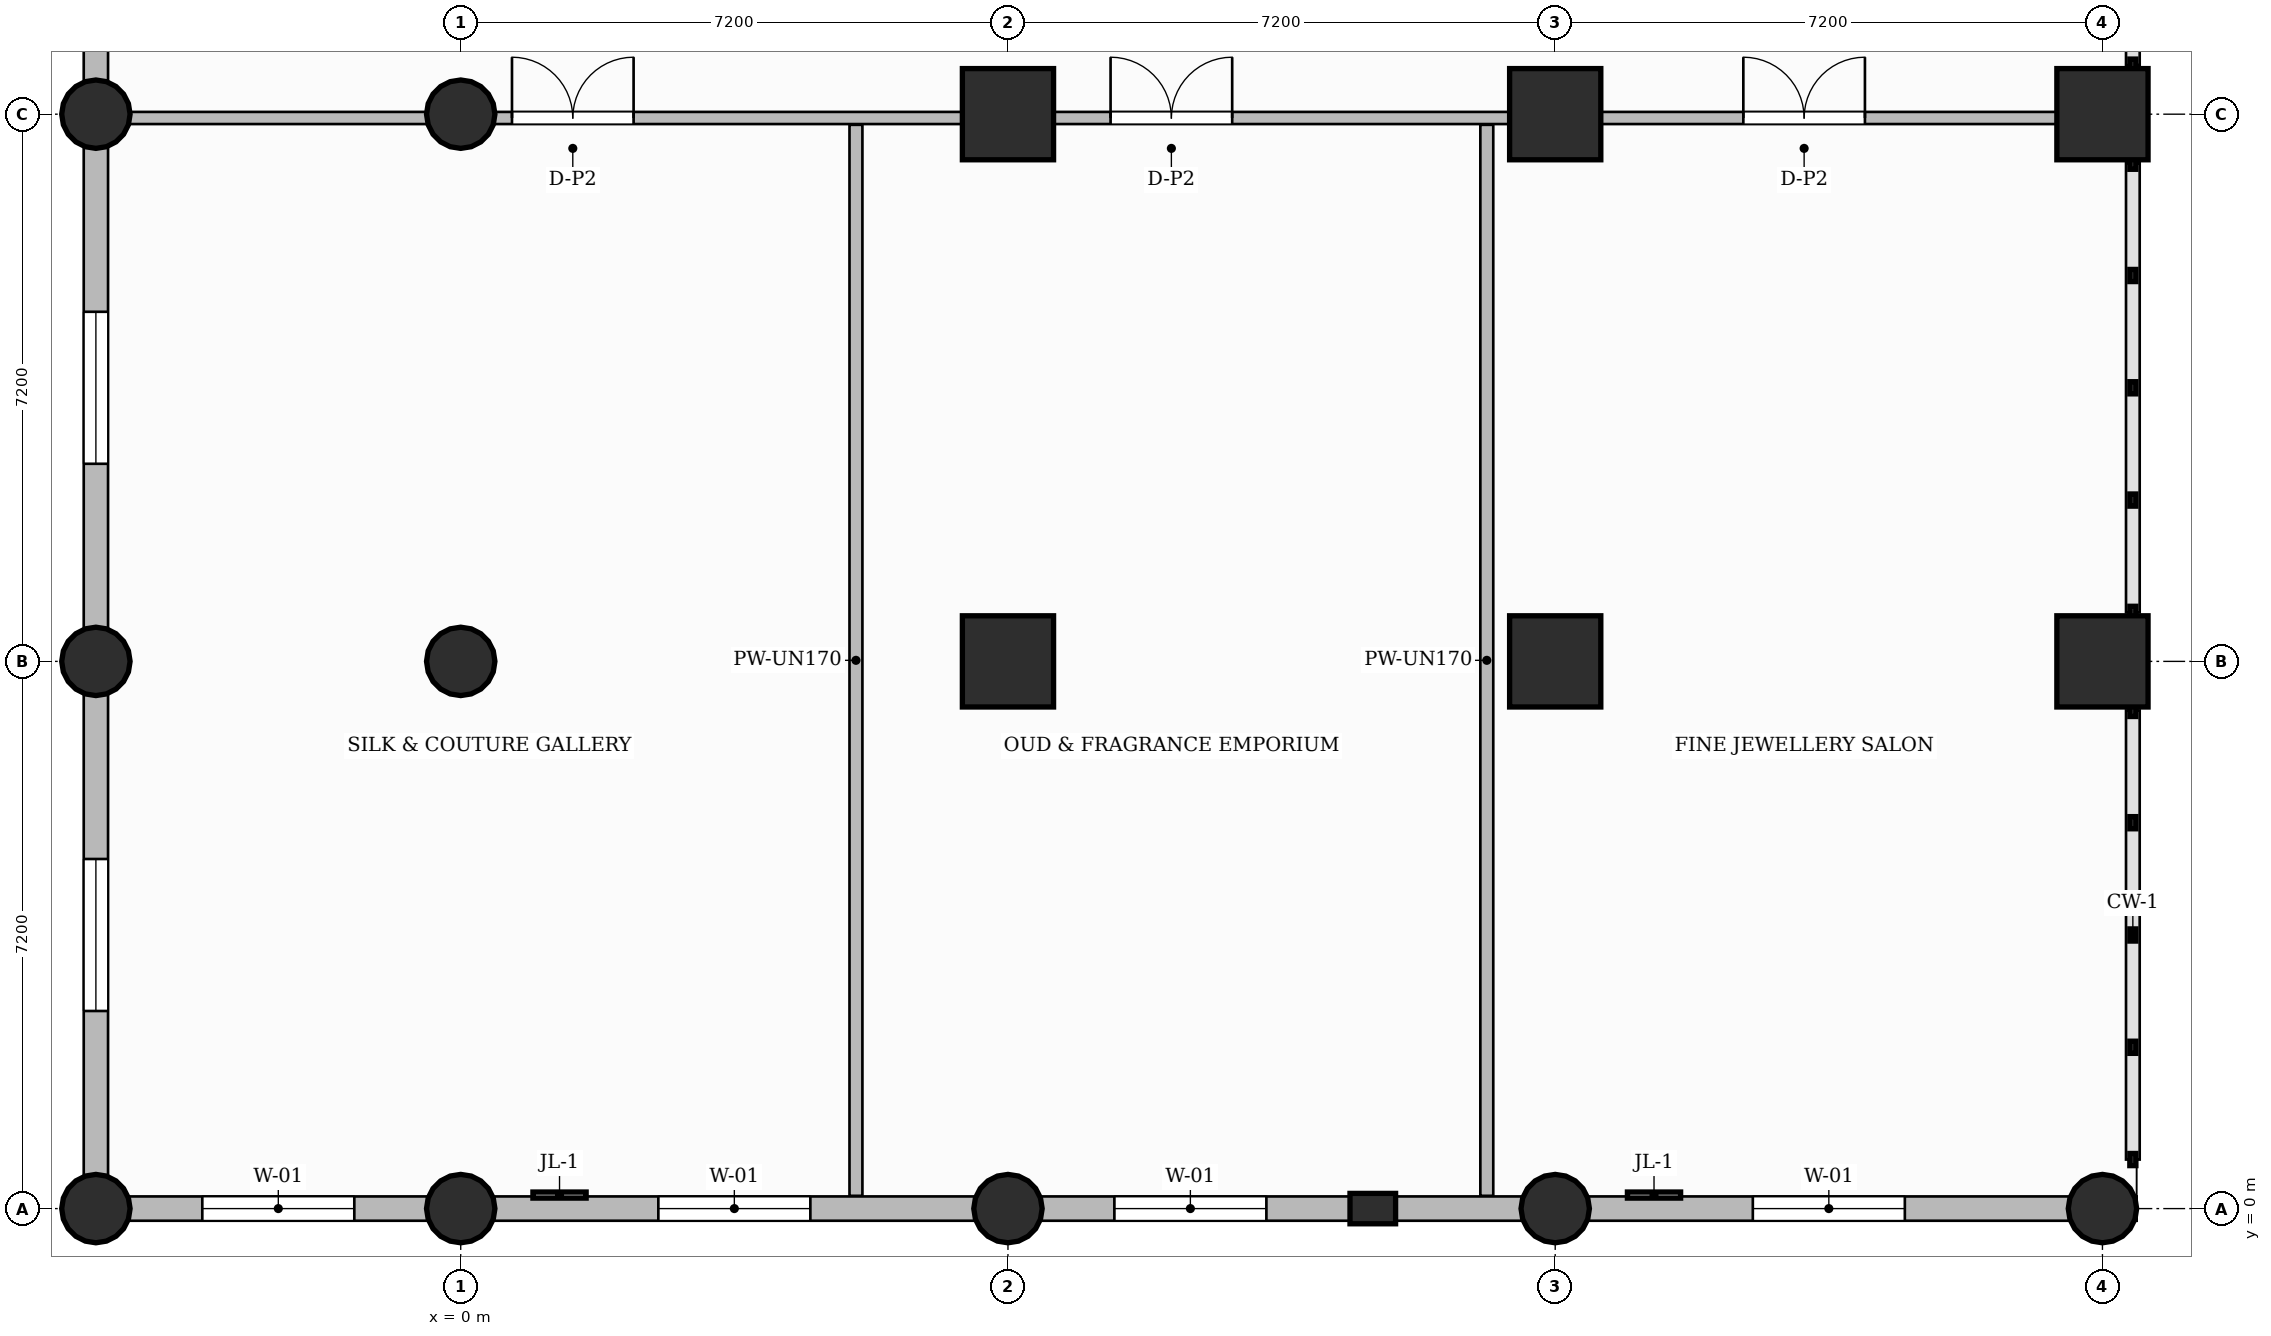
"""IFC4 building model, lengths in metres.
Left out: names, types, materials, properties, quantities, classifications, styles, units other than length and angle.
Written with IfcOpenShell. Run it as: python <this file> out.ifc"""

import sys

from ifc_helpers import new_model, si_unit, direction, frame, frame_2d, origin, origin_2d, place, context, subcontext, project, spatial, rectangle, circle, extrude, source, transform, mapped, element, fill, save


model = new_model("IFC4")
c1 = context("Model", 3, precision=1e-05, world=origin(), true_north=direction((0.0, 1.0)))
c2 = subcontext(c1, "Body", "Model", "MODEL_VIEW")
j1 = project(units=[si_unit("LENGTHUNIT", "METRE"), si_unit("PLANEANGLEUNIT", "RADIAN")], contexts=[c1])
p1 = place(None, origin())
s1 = spatial("IfcSite", under=j1, at=p1, CompositionType="ELEMENT")
p2 = place(p1, origin())
s2 = spatial("IfcBuilding", under=s1, at=p2, CompositionType="ELEMENT")
p3 = place(p2, frame((0.0, 0.0, 5.4)))
s3 = spatial("IfcBuildingStorey", under=s2, at=p3, CompositionType="ELEMENT", Elevation=5.4)
m1 = source(origin(), c2, "Body", "SweptSolid", [
    extrude(circle(Radius=0.45, at=origin_2d()), origin(), (0.0, 0.0, 1.0), 5.4),
])
for number, where, z_axis, x_axis in (
    (1, (-4.8, 0.0, 0.0), (0.0, 0.0, 1.0), (1.0, 0.0, 0.0)),
    (2, (-4.8, 7.2, 0.0), (0.0, 0.0, 1.0), (1.0, 0.0, 0.0)),
    (3, (-4.8, 14.4, 0.0), (0.0, 0.0, 1.0), (1.0, 0.0, 0.0)),
    (4, (0.0, 0.0, 0.0), (0.0, 0.0, 1.0), (1.0, 0.0, 0.0)),
    (5, (0.0, 7.2, 0.0), (0.0, 0.0, 1.0), (1.0, 0.0, 0.0)),
    (6, (0.0, 14.4, 0.0), (0.0, 0.0, 1.0), (1.0, 0.0, 0.0)),
    (7, (7.2, 0.0, 0.0), (0.0, 0.0, 1.0), (1.0, 0.0, 0.0)),
):
    element("IfcColumn", number, at=place(p3, frame(where, z_axis=z_axis, x_axis=x_axis)), inside=s3, PredefinedType="COLUMN", context=c2, shape_type="MappedRepresentation", body=[
        mapped(m1, transform((0.0, 0.0, 0.0), scale=1.0)),
    ])
m2 = source(origin(), c2, "Body", "SweptSolid", [
    extrude(rectangle(XDim=1.2, YDim=1.2, at=origin_2d()), origin(), (0.0, 0.0, 1.0), 5.4),
])
for number, where, z_axis, x_axis in (
    (8, (7.2, 7.2, 0.0), (0.0, 0.0, 1.0), (1.0, 0.0, 0.0)),
    (9, (7.2, 14.4, 0.0), (0.0, 0.0, 1.0), (1.0, 0.0, 0.0)),
):
    element("IfcColumn", number, at=place(p3, frame(where, z_axis=z_axis, x_axis=x_axis)), inside=s3, PredefinedType="COLUMN", context=c2, shape_type="MappedRepresentation", body=[
        mapped(m2, transform((0.0, 0.0, 0.0), scale=1.0)),
    ])
p4 = place(p3, frame((14.4, 0.0, 0.0), z_axis=(0.0, 0.0, 1.0), x_axis=(1.0, 0.0, 0.0)))
e10 = element("IfcColumn", 10, at=p4, inside=s3, PredefinedType="COLUMN", context=c2, shape_type="MappedRepresentation", body=[
    mapped(m1, transform((0.0, 0.0, 0.0), scale=1.0)),
])
for number, where, z_axis, x_axis in (
    (11, (14.4, 7.2, 0.0), (0.0, 0.0, 1.0), (1.0, 0.0, 0.0)),
    (12, (14.4, 14.4, 0.0), (0.0, 0.0, 1.0), (1.0, 0.0, 0.0)),
):
    element("IfcColumn", number, at=place(p3, frame(where, z_axis=z_axis, x_axis=x_axis)), inside=s3, PredefinedType="COLUMN", context=c2, shape_type="MappedRepresentation", body=[
        mapped(m2, transform((0.0, 0.0, 0.0), scale=1.0)),
    ])
p5 = place(p3, frame((21.6, 0.0, 0.0), z_axis=(0.0, 0.0, 1.0), x_axis=(1.0, 0.0, 0.0)))
e13 = element("IfcColumn", 13, at=p5, inside=s3, PredefinedType="COLUMN", context=c2, shape_type="MappedRepresentation", body=[
    mapped(m1, transform((0.0, 0.0, 0.0), scale=1.0)),
])
for number, where, z_axis, x_axis in (
    (14, (21.6, 7.2, 0.0), (0.0, 0.0, 1.0), (1.0, 0.0, 0.0)),
    (15, (21.6, 14.4, 0.0), (0.0, 0.0, 1.0), (1.0, 0.0, 0.0)),
):
    element("IfcColumn", number, at=place(p3, frame(where, z_axis=z_axis, x_axis=x_axis)), inside=s3, PredefinedType="COLUMN", context=c2, shape_type="MappedRepresentation", body=[
        mapped(m2, transform((0.0, 0.0, 0.0), scale=1.0)),
    ])
m3 = source(origin(), c2, "Body", "SweptSolid", [
    extrude(rectangle(XDim=0.6, YDim=0.4, at=origin_2d()), origin(), (0.0, 0.0, 1.0), 5.4),
])
p6 = place(p3, frame((12.0, 0.0, 0.0), z_axis=(0.0, 0.0, 1.0), x_axis=(1.0, 0.0, 0.0)))
e16 = element("IfcColumn", 16, at=p6, inside=s3, PredefinedType="PILASTER", context=c2, shape_type="MappedRepresentation", body=[
    mapped(m3, transform((0.0, 0.0, 0.0), scale=1.0)),
])
p7 = place(p3, frame((-4.36, 14.35, 0.0), z_axis=(0.0, 0.0, 1.0), x_axis=(1.0, 0.0, 0.0)))
e17 = element("IfcWall", 17, at=p7, inside=s3, PredefinedType="PARTITIONING", context=c2, shape_type="SweptSolid", body=[
    extrude(rectangle(XDim=26.12, YDim=0.16, at=frame_2d((13.06, 0.0))), origin(), (0.0, 0.0, 1.0), 4.185),
])
p8 = place(p7, frame((5.034, 0.0, 0.0)))
e18 = element("IfcOpeningElement", 18, at=p8, cuts=e17, PredefinedType="OPENING", context=c2, shape_type="SweptSolid", body=[
    extrude(rectangle(XDim=1.6, YDim=2.4, at=frame_2d((0.8, 1.2))), frame((0.0, 0.09, 0.0), z_axis=(0.0, -1.0, 0.0), x_axis=(1.0, 0.0, 0.0)), (0.0, 0.0, 1.0), 0.18),
])
p9 = place(p7, frame((12.91, 0.0, 0.0)))
e19 = element("IfcOpeningElement", 19, at=p9, cuts=e17, PredefinedType="OPENING", context=c2, shape_type="SweptSolid", body=[
    extrude(rectangle(XDim=1.6, YDim=2.4, at=frame_2d((0.8, 1.2))), frame((0.0, 0.09, 0.0), z_axis=(0.0, -1.0, 0.0), x_axis=(1.0, 0.0, 0.0)), (0.0, 0.0, 1.0), 0.18),
])
p10 = place(p7, frame((21.235, 0.0, 0.0)))
e20 = element("IfcOpeningElement", 20, at=p10, cuts=e17, PredefinedType="OPENING", context=c2, shape_type="SweptSolid", body=[
    extrude(rectangle(XDim=1.6, YDim=2.4, at=frame_2d((0.8, 1.2))), frame((0.0, 0.09, 0.0), z_axis=(0.0, -1.0, 0.0), x_axis=(1.0, 0.0, 0.0)), (0.0, 0.0, 1.0), 0.18),
])
for number, where, z_axis, x_axis in (
    (21, (5.2, 0.168, 0.0), (0.0, 0.0, 1.0), (0.0, 1.0, 0.0)),
    (22, (13.5, 0.168, 0.0), (0.0, 0.0, 1.0), (0.0, 1.0, 0.0)),
):
    element("IfcWall", number, at=place(p3, frame(where, z_axis=z_axis, x_axis=x_axis)), inside=s3, PredefinedType="PARTITIONING", context=c2, shape_type="SweptSolid", body=[
        extrude(rectangle(XDim=14.092, YDim=0.17, at=frame_2d((7.046, 0.0))), origin(), (0.0, 0.0, 1.0), 5.1),
    ])
p11 = place(p3, frame((-4.8, 0.0, 0.0), z_axis=(0.0, 0.0, 1.0), x_axis=(1.0, 0.0, 0.0)))
e23 = element("IfcWall", 23, at=p11, inside=s3, PredefinedType="SOLIDWALL", context=c2, shape_type="SweptSolid", body=[
    extrude(rectangle(XDim=26.85, YDim=0.32, at=frame_2d((13.425, 0.0))), origin(), (0.0, 0.0, 1.0), 4.185),
])
p12 = place(p11, frame((1.4, 0.0, 0.75)))
e24 = element("IfcOpeningElement", 24, at=p12, cuts=e23, PredefinedType="OPENING", context=c2, shape_type="SweptSolid", body=[
    extrude(rectangle(XDim=2.0, YDim=2.6, at=frame_2d((1.0, 1.3))), frame((0.0, 0.17, 0.0), z_axis=(0.0, -1.0, 0.0), x_axis=(1.0, 0.0, 0.0)), (0.0, 0.0, 1.0), 0.34),
])
p13 = place(p11, frame((7.4, 0.0, 0.75)))
e25 = element("IfcOpeningElement", 25, at=p13, cuts=e23, PredefinedType="OPENING", context=c2, shape_type="SweptSolid", body=[
    extrude(rectangle(XDim=2.0, YDim=2.6, at=frame_2d((1.0, 1.3))), frame((0.0, 0.17, 0.0), z_axis=(0.0, -1.0, 0.0), x_axis=(1.0, 0.0, 0.0)), (0.0, 0.0, 1.0), 0.34),
])
p14 = place(p11, frame((13.4, 0.0, 0.75)))
e26 = element("IfcOpeningElement", 26, at=p14, cuts=e23, PredefinedType="OPENING", context=c2, shape_type="SweptSolid", body=[
    extrude(rectangle(XDim=2.0, YDim=2.6, at=frame_2d((1.0, 1.3))), frame((0.0, 0.17, 0.0), z_axis=(0.0, -1.0, 0.0), x_axis=(1.0, 0.0, 0.0)), (0.0, 0.0, 1.0), 0.34),
])
p15 = place(p11, frame((21.8, 0.0, 0.75)))
e27 = element("IfcOpeningElement", 27, at=p15, cuts=e23, PredefinedType="OPENING", context=c2, shape_type="SweptSolid", body=[
    extrude(rectangle(XDim=2.0, YDim=2.6, at=frame_2d((1.0, 1.3))), frame((0.0, 0.17, 0.0), z_axis=(0.0, -1.0, 0.0), x_axis=(1.0, 0.0, 0.0)), (0.0, 0.0, 1.0), 0.34),
])
p16 = place(p3, frame((-4.8, 0.05, 0.0), z_axis=(0.0, 0.0, 1.0), x_axis=(0.0, 1.0, 0.0)))
e28 = element("IfcWall", 28, at=p16, inside=s3, PredefinedType="SOLIDWALL", context=c2, shape_type="SweptSolid", body=[
    extrude(rectangle(XDim=46.7, YDim=0.32, at=frame_2d((23.35, 0.0))), origin(), (0.0, 0.0, 1.0), 4.185),
])
p17 = place(p16, frame((2.55, 0.0, 0.75)))
e29 = element("IfcOpeningElement", 29, at=p17, cuts=e28, PredefinedType="OPENING", context=c2, shape_type="SweptSolid", body=[
    extrude(rectangle(XDim=2.0, YDim=2.6, at=frame_2d((1.0, 1.3))), frame((0.0, 0.17, 0.0), z_axis=(0.0, -1.0, 0.0), x_axis=(1.0, 0.0, 0.0)), (0.0, 0.0, 1.0), 0.34),
])
p18 = place(p16, frame((9.75, 0.0, 0.75)))
e30 = element("IfcOpeningElement", 30, at=p18, cuts=e28, PredefinedType="OPENING", context=c2, shape_type="SweptSolid", body=[
    extrude(rectangle(XDim=2.0, YDim=2.6, at=frame_2d((1.0, 1.3))), frame((0.0, 0.17, 0.0), z_axis=(0.0, -1.0, 0.0), x_axis=(1.0, 0.0, 0.0)), (0.0, 0.0, 1.0), 0.34),
])
p19 = place(p16, frame((16.95, 0.0, 0.75)))
e31 = element("IfcOpeningElement", 31, at=p19, cuts=e28, PredefinedType="OPENING", context=c2, shape_type="SweptSolid", body=[
    extrude(rectangle(XDim=2.0, YDim=2.6, at=frame_2d((1.0, 1.3))), frame((0.0, 0.17, 0.0), z_axis=(0.0, -1.0, 0.0), x_axis=(1.0, 0.0, 0.0)), (0.0, 0.0, 1.0), 0.34),
])
p20 = place(p16, frame((27.75, 0.0, 0.75)))
e32 = element("IfcOpeningElement", 32, at=p20, cuts=e28, PredefinedType="OPENING", context=c2, shape_type="SweptSolid", body=[
    extrude(rectangle(XDim=2.0, YDim=2.6, at=frame_2d((1.0, 1.3))), frame((0.0, 0.17, 0.0), z_axis=(0.0, -1.0, 0.0), x_axis=(1.0, 0.0, 0.0)), (0.0, 0.0, 1.0), 0.34),
])
p21 = place(p16, frame((34.95, 0.0, 0.75)))
e33 = element("IfcOpeningElement", 33, at=p21, cuts=e28, PredefinedType="OPENING", context=c2, shape_type="SweptSolid", body=[
    extrude(rectangle(XDim=2.0, YDim=2.6, at=frame_2d((1.0, 1.3))), frame((0.0, 0.17, 0.0), z_axis=(0.0, -1.0, 0.0), x_axis=(1.0, 0.0, 0.0)), (0.0, 0.0, 1.0), 0.34),
])
p22 = place(p16, frame((42.15, 0.0, 0.75)))
e34 = element("IfcOpeningElement", 34, at=p22, cuts=e28, PredefinedType="OPENING", context=c2, shape_type="SweptSolid", body=[
    extrude(rectangle(XDim=2.0, YDim=2.6, at=frame_2d((1.0, 1.3))), frame((0.0, 0.17, 0.0), z_axis=(0.0, -1.0, 0.0), x_axis=(1.0, 0.0, 0.0)), (0.0, 0.0, 1.0), 0.34),
])
m4 = source(origin(), c2, "Body", "SweptSolid", [
    extrude(rectangle(XDim=1.6, YDim=2.4, at=frame_2d((0.8, 1.2))), frame((0.0, 0.025, 0.0), z_axis=(0.0, -1.0, 0.0), x_axis=(1.0, 0.0, 0.0)), (0.0, 0.0, 1.0), 0.05),
])
p23 = place(p8, origin())
e35 = element("IfcDoor", 35, at=p23, inside=s3, OperationType="DOUBLE_DOOR_SINGLE_SWING", PredefinedType="DOOR", context=c2, shape_type="MappedRepresentation", body=[
    mapped(m4, transform((0.0, 0.0, 0.0), scale=1.0)),
])
fill(e18, e35)
p24 = place(p9, origin())
e36 = element("IfcDoor", 36, at=p24, inside=s3, OperationType="DOUBLE_DOOR_SINGLE_SWING", PredefinedType="DOOR", context=c2, shape_type="MappedRepresentation", body=[
    mapped(m4, transform((0.0, 0.0, 0.0), scale=1.0)),
])
fill(e19, e36)
p25 = place(p10, origin())
e37 = element("IfcDoor", 37, at=p25, inside=s3, OperationType="DOUBLE_DOOR_SINGLE_SWING", PredefinedType="DOOR", context=c2, shape_type="MappedRepresentation", body=[
    mapped(m4, transform((0.0, 0.0, 0.0), scale=1.0)),
])
fill(e20, e37)
m5 = source(origin(), c2, "Body", "SweptSolid", [
    extrude(rectangle(XDim=2.0, YDim=2.6, at=frame_2d((1.0, 1.3))), frame((0.0, 0.03, 0.0), z_axis=(0.0, -1.0, 0.0), x_axis=(1.0, 0.0, 0.0)), (0.0, 0.0, 1.0), 0.06),
])
p26 = place(p12, origin())
e38 = element("IfcWindow", 38, at=p26, inside=s3, PartitioningType="DOUBLE_PANEL_VERTICAL", PredefinedType="WINDOW", context=c2, shape_type="MappedRepresentation", body=[
    mapped(m5, transform((0.0, 0.0, 0.0), scale=1.0)),
])
fill(e24, e38)
p27 = place(p13, origin())
e39 = element("IfcWindow", 39, at=p27, inside=s3, PartitioningType="DOUBLE_PANEL_VERTICAL", PredefinedType="WINDOW", context=c2, shape_type="MappedRepresentation", body=[
    mapped(m5, transform((0.0, 0.0, 0.0), scale=1.0)),
])
fill(e25, e39)
p28 = place(p14, origin())
e40 = element("IfcWindow", 40, at=p28, inside=s3, PartitioningType="DOUBLE_PANEL_VERTICAL", PredefinedType="WINDOW", context=c2, shape_type="MappedRepresentation", body=[
    mapped(m5, transform((0.0, 0.0, 0.0), scale=1.0)),
])
fill(e26, e40)
p29 = place(p15, origin())
e41 = element("IfcWindow", 41, at=p29, inside=s3, PartitioningType="DOUBLE_PANEL_VERTICAL", PredefinedType="WINDOW", context=c2, shape_type="MappedRepresentation", body=[
    mapped(m5, transform((0.0, 0.0, 0.0), scale=1.0)),
])
fill(e27, e41)
p30 = place(p17, origin())
e42 = element("IfcWindow", 42, at=p30, inside=s3, PartitioningType="DOUBLE_PANEL_VERTICAL", PredefinedType="WINDOW", context=c2, shape_type="MappedRepresentation", body=[
    mapped(m5, transform((0.0, 0.0, 0.0), scale=1.0)),
])
fill(e29, e42)
p31 = place(p18, origin())
e43 = element("IfcWindow", 43, at=p31, inside=s3, PartitioningType="DOUBLE_PANEL_VERTICAL", PredefinedType="WINDOW", context=c2, shape_type="MappedRepresentation", body=[
    mapped(m5, transform((0.0, 0.0, 0.0), scale=1.0)),
])
fill(e30, e43)
save(model, sys.argv[1])
